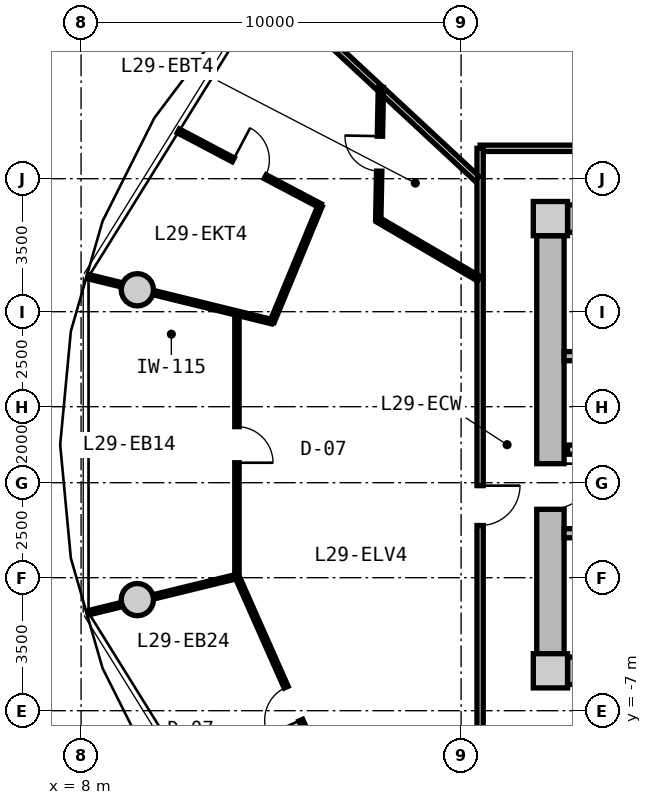
"""IFC4 building model, lengths in metres.
Left out: names, types, materials, properties, quantities, classifications, styles, units other than length and angle.
Written with IfcOpenShell. Run it as: python <this file> out.ifc"""

import sys

from ifc_helpers import new_model, si_unit, direction, frame, frame_2d, origin, origin_2d, place, context, subcontext, project, spatial, rectangle, circle, extrude, source, transform, mapped, element, fill, save


model = new_model("IFC4")
c1 = context("Model", 3, precision=1e-05, world=origin(), true_north=direction((0.0, 1.0)))
c2 = subcontext(c1, "Body", "Model", "MODEL_VIEW")
j1 = project(units=[si_unit("LENGTHUNIT", "METRE"), si_unit("PLANEANGLEUNIT", "RADIAN")], contexts=[c1])
p1 = place(None, origin())
s1 = spatial("IfcSite", under=j1, at=p1, CompositionType="ELEMENT")
p2 = place(p1, origin())
s2 = spatial("IfcBuilding", under=s1, at=p2, CompositionType="ELEMENT")
p3 = place(p2, frame((0.0, 0.0, 96.25)))
s3 = spatial("IfcBuildingStorey", under=s2, at=p3, CompositionType="ELEMENT", Elevation=96.25)
m1 = source(origin(), c2, "Body", "SweptSolid", [
    extrude(rectangle(XDim=0.9, YDim=0.9, at=origin_2d()), origin(), (0.0, 0.0, 1.0), 3.05),
])
for number, where, z_axis, x_axis in (
    (1, (20.35, -5.95, 0.0), (0.0, 0.0, 1.0), (1.0, 0.0, 0.0)),
    (2, (20.35, 5.95, 0.0), (0.0, 0.0, 1.0), (1.0, 0.0, 0.0)),
):
    element("IfcColumn", number, at=place(p3, frame(where, z_axis=z_axis, x_axis=x_axis)), inside=s3, PredefinedType="COLUMN", context=c2, shape_type="MappedRepresentation", body=[
        mapped(m1, transform((0.0, 0.0, 0.0), x_axis=(1.0, 0.0, 0.0), y_axis=(0.0, 1.0, 0.0), z_axis=(0.0, 0.0, 1.0), scale=1.0)),
    ])
m2 = source(origin(), c2, "Body", "SweptSolid", [
    extrude(rectangle(XDim=14.4, YDim=0.72, at=frame_2d((7.2, 0.0))), origin(), (0.0, 0.0, 1.0), 2.79),
])
for number, where, z_axis, x_axis in (
    (3, (20.8, 5.95, 0.0), (0.0, 0.0, 1.0), (1.0, 0.0, 0.0)),
    (4, (35.2, -5.95, 0.0), (0.0, 0.0, 1.0), (-1.0, 0.0, 0.0)),
):
    element("IfcWall", number, at=place(p3, frame(where, z_axis=z_axis, x_axis=x_axis)), inside=s3, PredefinedType="SHEAR", context=c2, shape_type="MappedRepresentation", body=[
        mapped(m2, transform((0.0, 0.0, 0.0), x_axis=(1.0, 0.0, 0.0), y_axis=(0.0, 1.0, 0.0), z_axis=(0.0, 0.0, 1.0), scale=1.0)),
    ])
m3 = source(origin(), c2, "Body", "SweptSolid", [
    extrude(rectangle(XDim=11.0, YDim=0.72, at=frame_2d((5.5, 0.0))), origin(), (0.0, 0.0, 1.0), 2.79),
])
p4 = place(p3, frame((20.35, -5.5, 0.0), z_axis=(0.0, 0.0, 1.0), x_axis=(0.0, 1.0, 0.0)))
e5 = element("IfcWall", 5, at=p4, inside=s3, PredefinedType="SHEAR", context=c2, shape_type="MappedRepresentation", body=[
    mapped(m3, transform((0.0, 0.0, 0.0), x_axis=(1.0, 0.0, 0.0), y_axis=(0.0, 1.0, 0.0), z_axis=(0.0, 0.0, 1.0), scale=1.0)),
])
p5 = place(p4, frame((3.8, 0.0, 0.0)))
e6 = element("IfcOpeningElement", 6, at=p5, cuts=e5, PredefinedType="OPENING", context=c2, shape_type="SweptSolid", body=[
    extrude(rectangle(XDim=1.2, YDim=2.15, at=frame_2d((0.6, 1.075))), frame((0.0, 0.37, 0.0), z_axis=(0.0, -1.0, 0.0), x_axis=(1.0, 0.0, 0.0)), (0.0, 0.0, 1.0), 0.74),
])
m4 = source(origin(), c2, "Body", "SweptSolid", [
    extrude(circle(Radius=0.425, at=origin_2d()), origin(), (0.0, 0.0, 1.0), 3.05),
])
for number, where, z_axis, x_axis in (
    (7, (9.481, 4.076, 0.0), (0.0, 0.0, 1.0), (1.0, 0.0, 0.0)),
    (8, (9.481, -4.076, 0.0), (0.0, 0.0, 1.0), (1.0, 0.0, 0.0)),
):
    element("IfcColumn", number, at=place(p3, frame(where, z_axis=z_axis, x_axis=x_axis)), inside=s3, PredefinedType="COLUMN", context=c2, shape_type="MappedRepresentation", body=[
        mapped(m4, transform((0.0, 0.0, 0.0), x_axis=(1.0, 0.0, 0.0), y_axis=(0.0, 1.0, 0.0), z_axis=(0.0, 0.0, 1.0), scale=1.0)),
    ])
m5 = source(origin(), c2, "Body", "SweptSolid", [
    extrude(rectangle(XDim=7.83, YDim=0.24, at=frame_2d((3.915, 0.0))), origin(), (0.0, 0.0, 1.0), 2.79),
])
p6 = place(p3, frame((20.71, 2.33, 0.0), z_axis=(0.0, 0.0, 1.0), x_axis=(1.0, 0.0, 0.0)))
e9 = element("IfcWall", 9, at=p6, inside=s3, PredefinedType="PARTITIONING", context=c2, shape_type="MappedRepresentation", body=[
    mapped(m5, transform((0.0, 0.0, 0.0), x_axis=(1.0, 0.0, 0.0), y_axis=(0.0, 1.0, 0.0), z_axis=(0.0, 0.0, 1.0), scale=1.0)),
])
p7 = place(p3, frame((20.71, -2.33, 0.0), z_axis=(0.0, 0.0, 1.0), x_axis=(1.0, 0.0, 0.0)))
e10 = element("IfcWall", 10, at=p7, inside=s3, PredefinedType="PARTITIONING", context=c2, shape_type="MappedRepresentation", body=[
    mapped(m5, transform((0.0, 0.0, 0.0), x_axis=(1.0, 0.0, 0.0), y_axis=(0.0, 1.0, 0.0), z_axis=(0.0, 0.0, 1.0), scale=1.0)),
])
p8 = place(p7, frame((0.95, 0.0, 0.0)))
e11 = element("IfcOpeningElement", 11, at=p8, cuts=e10, PredefinedType="OPENING", context=c2, shape_type="SweptSolid", body=[
    extrude(rectangle(XDim=1.1, YDim=2.15, at=frame_2d((0.55, 1.075))), frame((0.0, 0.13, 0.0), z_axis=(0.0, -1.0, 0.0), x_axis=(1.0, 0.0, 0.0)), (0.0, 0.0, 1.0), 0.26),
])
m6 = source(origin(), c2, "Body", "SweptSolid", [
    extrude(rectangle(XDim=7.62, YDim=0.24, at=frame_2d((3.81, 0.0))), origin(), (0.0, 0.0, 1.0), 2.775),
])
p9 = place(p3, frame((20.8, -0.13, 0.0), z_axis=(0.0, 0.0, 1.0), x_axis=(1.0, 0.0, 0.0)))
e12 = element("IfcWall", 12, at=p9, inside=s3, PredefinedType="PARTITIONING", context=c2, shape_type="MappedRepresentation", body=[
    mapped(m6, transform((0.0, 0.0, 0.0), x_axis=(1.0, 0.0, 0.0), y_axis=(0.0, 1.0, 0.0), z_axis=(0.0, 0.0, 1.0), scale=1.0)),
])
p10 = place(p9, frame((6.22, 0.0, 0.0)))
e13 = element("IfcOpeningElement", 13, at=p10, cuts=e12, PredefinedType="OPENING", context=c2, shape_type="SweptSolid", body=[
    extrude(rectangle(XDim=1.0, YDim=2.1, at=frame_2d((0.5, 1.05))), frame((0.0, 0.13, 0.0), z_axis=(0.0, -1.0, 0.0), x_axis=(1.0, 0.0, 0.0)), (0.0, 0.0, 1.0), 0.26),
])
p11 = place(p9, frame((2.4, 0.0, 0.0)))
e14 = element("IfcOpeningElement", 14, at=p11, cuts=e12, PredefinedType="OPENING", context=c2, shape_type="SweptSolid", body=[
    extrude(rectangle(XDim=1.0, YDim=2.1, at=frame_2d((0.5, 1.05))), frame((0.0, 0.13, 0.0), z_axis=(0.0, -1.0, 0.0), x_axis=(1.0, 0.0, 0.0)), (0.0, 0.0, 1.0), 0.26),
])
m7 = source(origin(), c2, "Body", "SweptSolid", [
    extrude(rectangle(XDim=8.6, YDim=0.165, at=frame_2d((4.3, 0.0))), origin(), (0.0, 0.0, 1.0), 2.775),
])
p12 = place(p3, frame((18.5, 7.8, 0.0), z_axis=(0.0, 0.0, 1.0), x_axis=(1.0, 0.0, 0.0)))
e15 = element("IfcWall", 15, at=p12, inside=s3, PredefinedType="PARTITIONING", context=c2, shape_type="MappedRepresentation", body=[
    mapped(m7, transform((0.0, 0.0, 0.0), x_axis=(1.0, 0.0, 0.0), y_axis=(0.0, 1.0, 0.0), z_axis=(0.0, 0.0, 1.0), scale=1.0)),
])
p13 = place(p12, frame((3.775, 0.0, 0.0)))
e16 = element("IfcOpeningElement", 16, at=p13, cuts=e15, PredefinedType="OPENING", context=c2, shape_type="SweptSolid", body=[
    extrude(rectangle(XDim=1.05, YDim=2.15, at=frame_2d((0.525, 1.075))), frame((0.0, 0.093, 0.0), z_axis=(0.0, -1.0, 0.0), x_axis=(1.0, 0.0, 0.0)), (0.0, 0.0, 1.0), 0.185),
])
m8 = source(origin(), c2, "Body", "SweptSolid", [
    extrude(rectangle(XDim=15.6, YDim=0.165, at=frame_2d((7.8, 0.0))), origin(), (0.0, 0.0, 1.0), 2.775),
])
p14 = place(p3, frame((18.5, -7.8, 0.0), z_axis=(0.0, 0.0, 1.0), x_axis=(0.0, 1.0, 0.0)))
e17 = element("IfcWall", 17, at=p14, inside=s3, PredefinedType="PARTITIONING", context=c2, shape_type="MappedRepresentation", body=[
    mapped(m8, transform((0.0, 0.0, 0.0), x_axis=(1.0, 0.0, 0.0), y_axis=(0.0, 1.0, 0.0), z_axis=(0.0, 0.0, 1.0), scale=1.0)),
])
p15 = place(p14, frame((5.673, 0.0, 0.0)))
e18 = element("IfcOpeningElement", 18, at=p15, cuts=e17, PredefinedType="OPENING", context=c2, shape_type="SweptSolid", body=[
    extrude(rectangle(XDim=1.05, YDim=2.15, at=frame_2d((0.525, 1.075))), frame((0.0, 0.093, 0.0), z_axis=(0.0, -1.0, 0.0), x_axis=(1.0, 0.0, 0.0)), (0.0, 0.0, 1.0), 0.185),
])
m9 = source(origin(), c2, "Body", "SweptSolid", [
    extrude(rectangle(XDim=7.482, YDim=0.165, at=frame_2d((3.741, 0.0))), origin(), (0.0, 0.0, 1.0), 2.275),
])
p16 = place(p3, frame((18.42, 6.998, 0.0), z_axis=(0.0, 0.0, 1.0), x_axis=(-0.732508698043, 0.680757671489, 0.0)))
e19 = element("IfcWall", 19, at=p16, inside=s3, PredefinedType="PARTITIONING", context=c2, shape_type="MappedRepresentation", body=[
    mapped(m9, transform((0.0, 0.0, 0.0), x_axis=(1.0, 0.0, 0.0), y_axis=(0.0, 1.0, 0.0), z_axis=(0.0, 0.0, 1.0), scale=1.0)),
])
m10 = source(origin(), c2, "Body", "SweptSolid", [
    extrude(rectangle(XDim=6.935, YDim=0.115, at=frame_2d((3.468, 0.0))), origin(), (0.0, 0.0, 1.0), 2.775),
])
p17 = place(p3, frame((12.101, 3.468, 0.0), z_axis=(0.0, 0.0, 1.0), x_axis=(0.0, -1.0, 0.0)))
e20 = element("IfcWall", 20, at=p17, inside=s3, PredefinedType="PARTITIONING", context=c2, shape_type="MappedRepresentation", body=[
    mapped(m10, transform((0.0, 0.0, 0.0), x_axis=(1.0, 0.0, 0.0), y_axis=(0.0, 1.0, 0.0), z_axis=(0.0, 0.0, 1.0), scale=1.0)),
])
p18 = place(p17, frame((2.993, 0.0, 0.0)))
e21 = element("IfcOpeningElement", 21, at=p18, cuts=e20, PredefinedType="OPENING", context=c2, shape_type="SweptSolid", body=[
    extrude(rectangle(XDim=0.95, YDim=2.1, at=frame_2d((0.475, 1.05))), frame((0.0, 0.067, 0.0), z_axis=(0.0, -1.0, 0.0), x_axis=(1.0, 0.0, 0.0)), (0.0, 0.0, 1.0), 0.135),
])
m11 = source(origin(), c2, "Body", "SweptSolid", [
    extrude(rectangle(XDim=4.992, YDim=0.115, at=frame_2d((2.496, 0.0))), origin(), (0.0, 0.0, 1.0), 2.275),
])
p19 = place(p3, frame((13.026, 3.236, 0.0), z_axis=(0.0, 0.0, 1.0), x_axis=(-0.971191841847, 0.238298985162, 0.0)))
e22 = element("IfcWall", 22, at=p19, inside=s3, PredefinedType="PARTITIONING", context=c2, shape_type="MappedRepresentation", body=[
    mapped(m11, transform((0.0, 0.0, 0.0), x_axis=(1.0, 0.0, 0.0), y_axis=(0.0, 1.0, 0.0), z_axis=(0.0, 0.0, 1.0), scale=1.0)),
])
m12 = source(origin(), c2, "Body", "SweptSolid", [
    extrude(rectangle(XDim=7.326, YDim=0.115, at=frame_2d((3.663, 0.0))), origin(), (0.0, 0.0, 1.0), 2.775),
])
p20 = place(p3, frame((12.104, -3.467, 0.0), z_axis=(0.0, 0.0, 1.0), x_axis=(0.405263245425, -0.914200033859, 0.0)))
e23 = element("IfcWall", 23, at=p20, inside=s3, PredefinedType="PARTITIONING", context=c2, shape_type="MappedRepresentation", body=[
    mapped(m12, transform((0.0, 0.0, 0.0), x_axis=(1.0, 0.0, 0.0), y_axis=(0.0, 1.0, 0.0), z_axis=(0.0, 0.0, 1.0), scale=1.0)),
])
p21 = place(p20, frame((3.188, 0.0, 0.0)))
e24 = element("IfcOpeningElement", 24, at=p21, cuts=e23, PredefinedType="OPENING", context=c2, shape_type="SweptSolid", body=[
    extrude(rectangle(XDim=0.95, YDim=2.1, at=frame_2d((0.475, 1.05))), frame((0.0, 0.067, 0.0), z_axis=(0.0, -1.0, 0.0), x_axis=(1.0, 0.0, 0.0)), (0.0, 0.0, 1.0), 0.135),
])
m13 = source(origin(), c2, "Body", "SweptSolid", [
    extrude(rectangle(XDim=4.042, YDim=0.115, at=frame_2d((2.021, 0.0))), origin(), (0.0, 0.0, 1.0), 2.275),
])
p22 = place(p3, frame((12.104, -3.467, 0.0), z_axis=(0.0, 0.0, 1.0), x_axis=(-0.971460277747, -0.237202295014, 0.0)))
e25 = element("IfcWall", 25, at=p22, inside=s3, PredefinedType="PARTITIONING", context=c2, shape_type="MappedRepresentation", body=[
    mapped(m13, transform((0.0, 0.0, 0.0), x_axis=(1.0, 0.0, 0.0), y_axis=(0.0, 1.0, 0.0), z_axis=(0.0, 0.0, 1.0), scale=1.0)),
])
m14 = source(origin(), c2, "Body", "SweptSolid", [
    extrude(rectangle(XDim=3.069, YDim=0.14, at=frame_2d((1.535, 0.0))), origin(), (0.0, 0.0, 1.0), 2.775),
])
p23 = place(p3, frame((18.47, 4.368, 0.0), z_axis=(0.0, 0.0, 1.0), x_axis=(-0.863524911282, 0.504306184371, 0.0)))
e26 = element("IfcWall", 26, at=p23, inside=s3, PredefinedType="PARTITIONING", context=c2, shape_type="MappedRepresentation", body=[
    mapped(m14, transform((0.0, 0.0, 0.0), x_axis=(1.0, 0.0, 0.0), y_axis=(0.0, 1.0, 0.0), z_axis=(0.0, 0.0, 1.0), scale=1.0)),
])
m15 = source(origin(), c2, "Body", "SweptSolid", [
    extrude(rectangle(XDim=3.487, YDim=0.14, at=frame_2d((1.743, 0.0))), origin(), (0.0, 0.0, 1.0), 2.775),
])
p24 = place(p3, frame((15.82, 5.916, 0.0), z_axis=(0.0, 0.0, 1.0), x_axis=(0.020026799331, 0.999799443543, 0.0)))
e27 = element("IfcWall", 27, at=p24, inside=s3, PredefinedType="PARTITIONING", context=c2, shape_type="MappedRepresentation", body=[
    mapped(m15, transform((0.0, 0.0, 0.0), x_axis=(1.0, 0.0, 0.0), y_axis=(0.0, 1.0, 0.0), z_axis=(0.0, 0.0, 1.0), scale=1.0)),
])
p25 = place(p24, frame((1.283, 0.0, 0.0)))
e28 = element("IfcOpeningElement", 28, at=p25, cuts=e27, PredefinedType="OPENING", context=c2, shape_type="SweptSolid", body=[
    extrude(rectangle(XDim=0.92, YDim=2.1, at=frame_2d((0.46, 1.05))), frame((0.0, 0.08, 0.0), z_axis=(0.0, -1.0, 0.0), x_axis=(1.0, 0.0, 0.0)), (0.0, 0.0, 1.0), 0.16),
])
m16 = source(origin(), c2, "Body", "SweptSolid", [
    extrude(rectangle(XDim=4.221, YDim=0.115, at=frame_2d((2.11, 0.0))), origin(), (0.0, 0.0, 1.0), 2.775),
])
p26 = place(p3, frame((14.292, 6.29, 0.0), z_axis=(0.0, 0.0, 1.0), x_axis=(-0.88458298465, 0.466382829087, 0.0)))
e29 = element("IfcWall", 29, at=p26, inside=s3, PredefinedType="PARTITIONING", context=c2, shape_type="MappedRepresentation", body=[
    mapped(m16, transform((0.0, 0.0, 0.0), x_axis=(1.0, 0.0, 0.0), y_axis=(0.0, 1.0, 0.0), z_axis=(0.0, 0.0, 1.0), scale=1.0)),
])
p27 = place(p26, frame((1.635, 0.0, 0.0)))
e30 = element("IfcOpeningElement", 30, at=p27, cuts=e29, PredefinedType="OPENING", context=c2, shape_type="SweptSolid", body=[
    extrude(rectangle(XDim=0.95, YDim=2.1, at=frame_2d((0.475, 1.05))), frame((0.0, 0.067, 0.0), z_axis=(0.0, -1.0, 0.0), x_axis=(1.0, 0.0, 0.0)), (0.0, 0.0, 1.0), 0.135),
])
m17 = source(origin(), c2, "Body", "SweptSolid", [
    extrude(rectangle(XDim=3.306, YDim=0.115, at=frame_2d((1.653, 0.0))), origin(), (0.0, 0.0, 1.0), 2.775),
])
p28 = place(p3, frame((14.292, 6.29, 0.0), z_axis=(0.0, 0.0, 1.0), x_axis=(-0.382506175075, -0.923952934965, 0.0)))
e31 = element("IfcWall", 31, at=p28, inside=s3, PredefinedType="PARTITIONING", context=c2, shape_type="MappedRepresentation", body=[
    mapped(m17, transform((0.0, 0.0, 0.0), x_axis=(1.0, 0.0, 0.0), y_axis=(0.0, 1.0, 0.0), z_axis=(0.0, 0.0, 1.0), scale=1.0)),
])
m18 = source(origin(), c2, "Body", "SweptSolid", [
    extrude(rectangle(XDim=1.2, YDim=2.15, at=frame_2d((0.6, 1.075))), frame((0.0, 0.025, 0.0), z_axis=(0.0, -1.0, 0.0), x_axis=(1.0, 0.0, 0.0)), (0.0, 0.0, 1.0), 0.05),
])
p29 = place(p5, frame((1.2, 0.0, 0.0), z_axis=(0.0, 0.0, 1.0), x_axis=(-1.0, 0.0, 0.0)))
e32 = element("IfcDoor", 32, at=p29, inside=s3, OperationType="SINGLE_SWING_LEFT", PredefinedType="DOOR", context=c2, shape_type="MappedRepresentation", body=[
    mapped(m18, transform((0.0, 0.0, 0.0), x_axis=(1.0, 0.0, 0.0), y_axis=(0.0, 1.0, 0.0), z_axis=(0.0, 0.0, 1.0), scale=1.0)),
])
fill(e6, e32)
m19 = source(origin(), c2, "Body", "SweptSolid", [
    extrude(rectangle(XDim=1.05, YDim=2.15, at=frame_2d((0.525, 1.075))), frame((0.0, 0.025, 0.0), z_axis=(0.0, -1.0, 0.0), x_axis=(1.0, 0.0, 0.0)), (0.0, 0.0, 1.0), 0.05),
])
p30 = place(p15, frame((1.05, 0.0, 0.0), z_axis=(0.0, 0.0, 1.0), x_axis=(-1.0, 0.0, 0.0)))
e33 = element("IfcDoor", 33, at=p30, inside=s3, OperationType="SINGLE_SWING_LEFT", PredefinedType="DOOR", context=c2, shape_type="MappedRepresentation", body=[
    mapped(m19, transform((0.0, 0.0, 0.0), x_axis=(1.0, 0.0, 0.0), y_axis=(0.0, 1.0, 0.0), z_axis=(0.0, 0.0, 1.0), scale=1.0)),
])
fill(e18, e33)
m20 = source(origin(), c2, "Body", "SweptSolid", [
    extrude(rectangle(XDim=0.92, YDim=2.1, at=frame_2d((0.46, 1.05))), frame((0.0, 0.025, 0.0), z_axis=(0.0, -1.0, 0.0), x_axis=(1.0, 0.0, 0.0)), (0.0, 0.0, 1.0), 0.05),
])
p31 = place(p25, origin())
e34 = element("IfcDoor", 34, at=p31, inside=s3, OperationType="SINGLE_SWING_RIGHT", PredefinedType="DOOR", context=c2, shape_type="MappedRepresentation", body=[
    mapped(m20, transform((0.0, 0.0, 0.0), x_axis=(1.0, 0.0, 0.0), y_axis=(0.0, 1.0, 0.0), z_axis=(0.0, 0.0, 1.0), scale=1.0)),
])
fill(e28, e34)
m21 = source(origin(), c2, "Body", "SweptSolid", [
    extrude(rectangle(XDim=0.95, YDim=2.1, at=frame_2d((0.475, 1.05))), frame((0.0, 0.025, 0.0), z_axis=(0.0, -1.0, 0.0), x_axis=(1.0, 0.0, 0.0)), (0.0, 0.0, 1.0), 0.05),
])
p32 = place(p27, frame((0.95, 0.0, 0.0), z_axis=(0.0, 0.0, 1.0), x_axis=(-1.0, 0.0, 0.0)))
e35 = element("IfcDoor", 35, at=p32, inside=s3, OperationType="SINGLE_SWING_LEFT", PredefinedType="DOOR", context=c2, shape_type="MappedRepresentation", body=[
    mapped(m21, transform((0.0, 0.0, 0.0), x_axis=(1.0, 0.0, 0.0), y_axis=(0.0, 1.0, 0.0), z_axis=(0.0, 0.0, 1.0), scale=1.0)),
])
fill(e30, e35)
p33 = place(p18, origin())
e36 = element("IfcDoor", 36, at=p33, inside=s3, OperationType="SINGLE_SWING_RIGHT", PredefinedType="DOOR", context=c2, shape_type="MappedRepresentation", body=[
    mapped(m21, transform((0.0, 0.0, 0.0), x_axis=(1.0, 0.0, 0.0), y_axis=(0.0, 1.0, 0.0), z_axis=(0.0, 0.0, 1.0), scale=1.0)),
])
fill(e21, e36)
p34 = place(p21, frame((0.95, 0.0, 0.0), z_axis=(0.0, 0.0, 1.0), x_axis=(-1.0, 0.0, 0.0)))
e37 = element("IfcDoor", 37, at=p34, inside=s3, OperationType="SINGLE_SWING_LEFT", PredefinedType="DOOR", context=c2, shape_type="MappedRepresentation", body=[
    mapped(m21, transform((0.0, 0.0, 0.0), x_axis=(1.0, 0.0, 0.0), y_axis=(0.0, 1.0, 0.0), z_axis=(0.0, 0.0, 1.0), scale=1.0)),
])
fill(e24, e37)
save(model, sys.argv[1])
